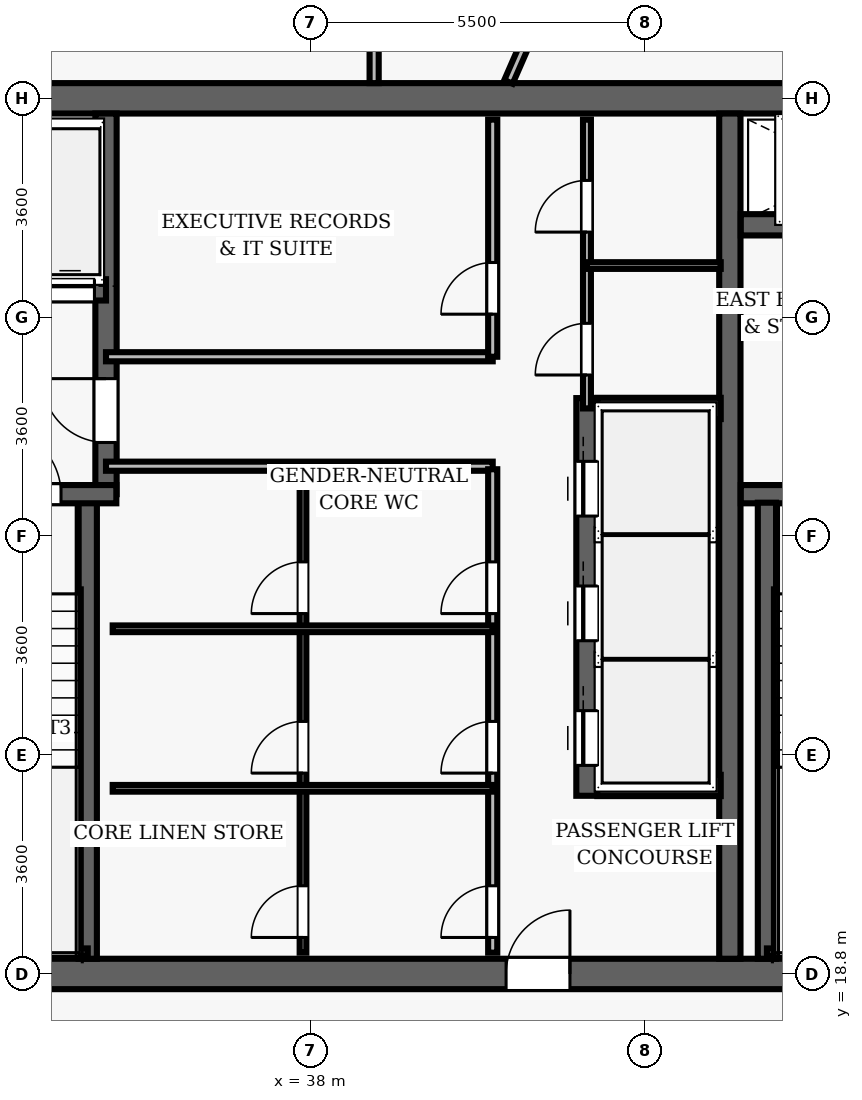
"""IFC4 building model, lengths in metres.
Left out: names, types, materials, properties, quantities, classifications, styles, units other than length and angle.
Written with IfcOpenShell. Run it as: python <this file> out.ifc"""

import sys

from ifc_helpers import new_model, si_unit, direction, frame, frame_2d, origin, place, context, subcontext, project, spatial, rectangle, extrude, element, fill, save


model = new_model("IFC4")
c1 = context("Model", 3, precision=1e-05, world=origin(), true_north=direction((0.0, 1.0)))
c2 = subcontext(c1, "Body", "Model", "MODEL_VIEW")
j1 = project(units=[si_unit("LENGTHUNIT", "METRE"), si_unit("PLANEANGLEUNIT", "RADIAN")], contexts=[c1])
p1 = place(None, origin())
s1 = spatial("IfcSite", under=j1, at=p1, CompositionType="ELEMENT")
p2 = place(p1, origin())
s2 = spatial("IfcBuilding", under=s1, at=p2, CompositionType="ELEMENT")
p3 = place(p2, frame((0.0, 0.0, 269.0)))
s3 = spatial("IfcBuildingStorey", under=s2, at=p3, CompositionType="ELEMENT", Elevation=269.0)
p4 = place(p3, frame((26.75, 18.8, 0.0), z_axis=(0.0, 0.0, 1.0), x_axis=(1.0, 0.0, 0.0)))
e1 = element("IfcWall", 1, at=p4, inside=s3, PredefinedType="SHEAR", context=c2, shape_type="SweptSolid", body=[
    extrude(rectangle(XDim=22.5, YDim=0.5, at=frame_2d((11.25, 0.0))), origin(), (0.0, 0.0, 1.0), 3.85),
])
p5 = place(p4, frame((14.47, 0.0, 0.0)))
e2 = element("IfcOpeningElement", 2, at=p5, cuts=e1, PredefinedType="OPENING", context=c2, shape_type="SweptSolid", body=[
    extrude(rectangle(XDim=1.05, YDim=2.15, at=frame_2d((0.525, 1.075))), frame((0.0, 0.26, 0.0), z_axis=(0.0, -1.0, 0.0), x_axis=(1.0, 0.0, 0.0)), (0.0, 0.0, 1.0), 0.52),
])
p6 = place(p3, frame((26.75, 33.2, 0.0), z_axis=(0.0, 0.0, 1.0), x_axis=(1.0, 0.0, 0.0)))
e3 = element("IfcWall", 3, at=p6, inside=s3, PredefinedType="SHEAR", context=c2, shape_type="SweptSolid", body=[
    extrude(rectangle(XDim=22.5, YDim=0.5, at=frame_2d((11.25, 0.0))), origin(), (0.0, 0.0, 1.0), 3.85),
])
p7 = place(p3, frame((44.9, 19.05, 0.0), z_axis=(0.0, 0.0, 1.0), x_axis=(0.0, 1.0, 0.0)))
e4 = element("IfcWall", 4, at=p7, inside=s3, PredefinedType="SHEAR", context=c2, shape_type="SweptSolid", body=[
    extrude(rectangle(XDim=13.9, YDim=0.35, at=frame_2d((6.95, 0.0))), origin(), (0.0, 0.0, 1.0), 3.85),
])
p8 = place(p3, frame((45.08, 26.69, 0.0), z_axis=(0.0, 0.0, 1.0), x_axis=(1.0, 0.0, 0.0)))
e5 = element("IfcWall", 5, at=p8, inside=s3, PredefinedType="SHEAR", context=c2, shape_type="SweptSolid", body=[
    extrude(rectangle(XDim=3.67, YDim=0.3, at=frame_2d((1.835, 0.0))), origin(), (0.0, 0.0, 1.0), 3.85),
])
p9 = place(p8, frame((1.05, 0.0, 0.0)))
e6 = element("IfcOpeningElement", 6, at=p9, cuts=e5, PredefinedType="OPENING", context=c2, shape_type="SweptSolid", body=[
    extrude(rectangle(XDim=1.1, YDim=2.15, at=frame_2d((0.55, 1.075))), frame((0.0, 0.16, 0.0), z_axis=(0.0, -1.0, 0.0), x_axis=(1.0, 0.0, 0.0)), (0.0, 0.0, 1.0), 0.32),
])
p10 = place(p3, frame((45.51, 19.05, 0.0), z_axis=(0.0, 0.0, 1.0), x_axis=(0.0, 1.0, 0.0)))
e7 = element("IfcWall", 7, at=p10, inside=s3, PredefinedType="SHEAR", context=c2, shape_type="SweptSolid", body=[
    extrude(rectangle(XDim=7.5, YDim=0.3, at=frame_2d((3.75, 0.0))), origin(), (0.0, 0.0, 1.0), 3.85),
])
p11 = place(p3, frame((45.51, 19.16, 0.0), z_axis=(0.0, 0.0, 1.0), x_axis=(1.0, 0.0, 0.0)))
e8 = element("IfcWall", 8, at=p11, inside=s3, PredefinedType="SHEAR", context=c2, shape_type="SweptSolid", body=[
    extrude(rectangle(XDim=3.095, YDim=0.12, at=frame_2d((1.547, 0.0))), origin(), (0.0, 0.0, 1.0), 3.85),
])
p12 = place(p3, frame((45.08, 31.12, 0.0), z_axis=(0.0, 0.0, 1.0), x_axis=(1.0, 0.0, 0.0)))
e9 = element("IfcWall", 9, at=p12, inside=s3, PredefinedType="SHEAR", context=c2, shape_type="SweptSolid", body=[
    extrude(rectangle(XDim=3.67, YDim=0.35, at=frame_2d((1.835, 0.0))), origin(), (0.0, 0.0, 1.0), 3.04),
])
p13 = place(p12, frame((1.25, 0.0, 0.0)))
e10 = element("IfcOpeningElement", 10, at=p13, cuts=e9, PredefinedType="OPENING", context=c2, shape_type="SweptSolid", body=[
    extrude(rectangle(XDim=1.1, YDim=2.15, at=frame_2d((0.55, 1.075))), frame((0.0, 0.185, 0.0), z_axis=(0.0, -1.0, 0.0), x_axis=(1.0, 0.0, 0.0)), (0.0, 0.0, 1.0), 0.37),
])
p14 = place(p3, frame((34.34, 19.05, 0.0), z_axis=(0.0, 0.0, 1.0), x_axis=(0.0, 1.0, 0.0)))
e11 = element("IfcWall", 11, at=p14, inside=s3, PredefinedType="SHEAR", context=c2, shape_type="SweptSolid", body=[
    extrude(rectangle(XDim=7.5, YDim=0.3, at=frame_2d((3.75, 0.0))), origin(), (0.0, 0.0, 1.0), 3.85),
])
p15 = place(p3, frame((34.64, 26.69, 0.0), z_axis=(0.0, 0.0, 1.0), x_axis=(0.0, 1.0, 0.0)))
e12 = element("IfcWall", 12, at=p15, inside=s3, PredefinedType="SHEAR", context=c2, shape_type="SweptSolid", body=[
    extrude(rectangle(XDim=6.26, YDim=0.35, at=frame_2d((3.13, 0.0))), origin(), (0.0, 0.0, 1.0), 3.85),
])
p16 = place(p15, frame((0.85, 0.0, 0.0)))
e13 = element("IfcOpeningElement", 13, at=p16, cuts=e12, PredefinedType="OPENING", context=c2, shape_type="SweptSolid", body=[
    extrude(rectangle(XDim=1.05, YDim=2.15, at=frame_2d((0.525, 1.075))), frame((0.0, 0.185, 0.0), z_axis=(0.0, -1.0, 0.0), x_axis=(1.0, 0.0, 0.0)), (0.0, 0.0, 1.0), 0.37),
])
p17 = place(p3, frame((31.25, 26.69, 0.0), z_axis=(0.0, 0.0, 1.0), x_axis=(1.0, 0.0, 0.0)))
e14 = element("IfcWall", 14, at=p17, inside=s3, PredefinedType="SHEAR", context=c2, shape_type="SweptSolid", body=[
    extrude(rectangle(XDim=3.56, YDim=0.3, at=frame_2d((1.78, 0.0))), origin(), (0.0, 0.0, 1.0), 3.85),
])
p18 = place(p17, frame((1.55, 0.0, 0.0)))
e15 = element("IfcOpeningElement", 15, at=p18, cuts=e14, PredefinedType="OPENING", context=c2, shape_type="SweptSolid", body=[
    extrude(rectangle(XDim=1.1, YDim=2.15, at=frame_2d((0.55, 1.075))), frame((0.0, 0.16, 0.0), z_axis=(0.0, -1.0, 0.0), x_axis=(1.0, 0.0, 0.0)), (0.0, 0.0, 1.0), 0.32),
])
p19 = place(p3, frame((31.3, 19.16, 0.0), z_axis=(0.0, 0.0, 1.0), x_axis=(1.0, 0.0, 0.0)))
e16 = element("IfcWall", 16, at=p19, inside=s3, PredefinedType="SHEAR", context=c2, shape_type="SweptSolid", body=[
    extrude(rectangle(XDim=3.04, YDim=0.12, at=frame_2d((1.52, 0.0))), origin(), (0.0, 0.0, 1.0), 3.85),
])
p20 = place(p3, frame((32.23, 30.05, 0.0), z_axis=(0.0, 0.0, 1.0), x_axis=(1.0, 0.0, 0.0)))
e17 = element("IfcWall", 17, at=p20, inside=s3, PredefinedType="SHEAR", context=c2, shape_type="SweptSolid", body=[
    extrude(rectangle(XDim=2.41, YDim=0.35, at=frame_2d((1.205, 0.0))), origin(), (0.0, 0.0, 1.0), 3.04),
])
p21 = place(p20, frame((0.42, 0.0, 0.0)))
e18 = element("IfcOpeningElement", 18, at=p21, cuts=e17, PredefinedType="OPENING", context=c2, shape_type="SweptSolid", body=[
    extrude(rectangle(XDim=0.8, YDim=2.15, at=frame_2d((0.4, 1.075))), frame((0.0, 0.185, 0.0), z_axis=(0.0, -1.0, 0.0), x_axis=(1.0, 0.0, 0.0)), (0.0, 0.0, 1.0), 0.37),
])
p22 = place(p20, frame((1.42, 0.0, 0.0)))
e19 = element("IfcOpeningElement", 19, at=p22, cuts=e17, PredefinedType="OPENING", context=c2, shape_type="SweptSolid", body=[
    extrude(rectangle(XDim=0.8, YDim=2.15, at=frame_2d((0.4, 1.075))), frame((0.0, 0.185, 0.0), z_axis=(0.0, -1.0, 0.0), x_axis=(1.0, 0.0, 0.0)), (0.0, 0.0, 1.0), 0.37),
])
p23 = place(p3, frame((42.55, 21.73, 0.0), z_axis=(0.0, 0.0, 1.0), x_axis=(0.0, 1.0, 0.0)))
e20 = element("IfcWall", 20, at=p23, inside=s3, PredefinedType="SHEAR", context=c2, shape_type="SweptSolid", body=[
    extrude(rectangle(XDim=6.54, YDim=0.35, at=frame_2d((3.27, 0.0))), origin(), (0.0, 0.0, 1.0), 3.04),
])
p24 = place(p23, frame((0.5, 0.0, 0.0)))
e21 = element("IfcOpeningElement", 21, at=p24, cuts=e20, PredefinedType="OPENING", context=c2, shape_type="SweptSolid", body=[
    extrude(rectangle(XDim=0.9, YDim=2.15, at=frame_2d((0.45, 1.075))), frame((0.0, 0.185, 0.0), z_axis=(0.0, -1.0, 0.0), x_axis=(1.0, 0.0, 0.0)), (0.0, 0.0, 1.0), 0.37),
])
p25 = place(p23, frame((2.55, 0.0, 0.0)))
e22 = element("IfcOpeningElement", 22, at=p25, cuts=e20, PredefinedType="OPENING", context=c2, shape_type="SweptSolid", body=[
    extrude(rectangle(XDim=0.9, YDim=2.15, at=frame_2d((0.45, 1.075))), frame((0.0, 0.185, 0.0), z_axis=(0.0, -1.0, 0.0), x_axis=(1.0, 0.0, 0.0)), (0.0, 0.0, 1.0), 0.37),
])
p26 = place(p23, frame((4.6, 0.0, 0.0)))
e23 = element("IfcOpeningElement", 23, at=p26, cuts=e20, PredefinedType="OPENING", context=c2, shape_type="SweptSolid", body=[
    extrude(rectangle(XDim=0.9, YDim=2.15, at=frame_2d((0.45, 1.075))), frame((0.0, 0.185, 0.0), z_axis=(0.0, -1.0, 0.0), x_axis=(1.0, 0.0, 0.0)), (0.0, 0.0, 1.0), 0.37),
])
for number, where, z_axis, x_axis in (
    (24, (42.72, 21.9, 0.0), (0.0, 0.0, 1.0), (1.0, 0.0, 0.0)),
    (25, (42.72, 28.1, 0.0), (0.0, 0.0, 1.0), (1.0, 0.0, 0.0)),
):
    element("IfcWall", number, at=place(p3, frame(where, z_axis=z_axis, x_axis=x_axis)), inside=s3, PredefinedType="SHEAR", context=c2, shape_type="SweptSolid", body=[
        extrude(rectangle(XDim=2.03, YDim=0.35, at=frame_2d((1.015, 0.0))), origin(), (0.0, 0.0, 1.0), 3.04),
    ])
for number, where, z_axis, x_axis in (
    (26, (34.64, 27.15, 0.0), (0.0, 0.0, 1.0), (1.0, 0.0, 0.0)),
    (27, (34.64, 28.95, 0.0), (0.0, 0.0, 1.0), (1.0, 0.0, 0.0)),
):
    element("IfcWall", number, at=place(p3, frame(where, z_axis=z_axis, x_axis=x_axis)), inside=s3, PredefinedType="PARTITIONING", context=c2, shape_type="SweptSolid", body=[
        extrude(rectangle(XDim=6.36, YDim=0.15, at=frame_2d((3.18, 0.0))), origin(), (0.0, 0.0, 1.0), 3.04),
    ])
p27 = place(p3, frame((41.0, 28.95, 0.0), z_axis=(0.0, 0.0, 1.0), x_axis=(0.0, 1.0, 0.0)))
e28 = element("IfcWall", 28, at=p27, inside=s3, PredefinedType="PARTITIONING", context=c2, shape_type="SweptSolid", body=[
    extrude(rectangle(XDim=3.9, YDim=0.15, at=frame_2d((1.95, 0.0))), origin(), (0.0, 0.0, 1.0), 3.04),
])
p28 = place(p27, frame((0.7, 0.0, 0.0)))
e29 = element("IfcOpeningElement", 29, at=p28, cuts=e28, PredefinedType="OPENING", context=c2, shape_type="SweptSolid", body=[
    extrude(rectangle(XDim=0.85, YDim=2.1, at=frame_2d((0.425, 1.05))), frame((0.0, 0.085, 0.0), z_axis=(0.0, -1.0, 0.0), x_axis=(1.0, 0.0, 0.0)), (0.0, 0.0, 1.0), 0.17),
])
p29 = place(p3, frame((41.0, 19.15, 0.0), z_axis=(0.0, 0.0, 1.0), x_axis=(0.0, 1.0, 0.0)))
e30 = element("IfcWall", 30, at=p29, inside=s3, PredefinedType="PARTITIONING", context=c2, shape_type="SweptSolid", body=[
    extrude(rectangle(XDim=7.95, YDim=0.15, at=frame_2d((3.975, 0.0))), origin(), (0.0, 0.0, 1.0), 3.04),
])
p30 = place(p29, frame((0.25, 0.0, 0.0)))
e31 = element("IfcOpeningElement", 31, at=p30, cuts=e30, PredefinedType="OPENING", context=c2, shape_type="SweptSolid", body=[
    extrude(rectangle(XDim=0.85, YDim=2.1, at=frame_2d((0.425, 1.05))), frame((0.0, 0.085, 0.0), z_axis=(0.0, -1.0, 0.0), x_axis=(1.0, 0.0, 0.0)), (0.0, 0.0, 1.0), 0.17),
])
p31 = place(p29, frame((2.953, 0.0, 0.0)))
e32 = element("IfcOpeningElement", 32, at=p31, cuts=e30, PredefinedType="OPENING", context=c2, shape_type="SweptSolid", body=[
    extrude(rectangle(XDim=0.85, YDim=2.1, at=frame_2d((0.425, 1.05))), frame((0.0, 0.085, 0.0), z_axis=(0.0, -1.0, 0.0), x_axis=(1.0, 0.0, 0.0)), (0.0, 0.0, 1.0), 0.17),
])
p32 = place(p29, frame((5.576, 0.0, 0.0)))
e33 = element("IfcOpeningElement", 33, at=p32, cuts=e30, PredefinedType="OPENING", context=c2, shape_type="SweptSolid", body=[
    extrude(rectangle(XDim=0.85, YDim=2.1, at=frame_2d((0.425, 1.05))), frame((0.0, 0.085, 0.0), z_axis=(0.0, -1.0, 0.0), x_axis=(1.0, 0.0, 0.0)), (0.0, 0.0, 1.0), 0.17),
])
p33 = place(p3, frame((37.88, 19.15, 0.0), z_axis=(0.0, 0.0, 1.0), x_axis=(0.0, 1.0, 0.0)))
e34 = element("IfcWall", 34, at=p33, inside=s3, PredefinedType="PARTITIONING", context=c2, shape_type="SweptSolid", body=[
    extrude(rectangle(XDim=7.95, YDim=0.11, at=frame_2d((3.975, 0.0))), origin(), (0.0, 0.0, 1.0), 3.04),
])
p34 = place(p33, frame((0.25, 0.0, 0.0)))
e35 = element("IfcOpeningElement", 35, at=p34, cuts=e34, PredefinedType="OPENING", context=c2, shape_type="SweptSolid", body=[
    extrude(rectangle(XDim=0.85, YDim=2.1, at=frame_2d((0.425, 1.05))), frame((0.0, 0.065, 0.0), z_axis=(0.0, -1.0, 0.0), x_axis=(1.0, 0.0, 0.0)), (0.0, 0.0, 1.0), 0.13),
])
p35 = place(p33, frame((2.953, 0.0, 0.0)))
e36 = element("IfcOpeningElement", 36, at=p35, cuts=e34, PredefinedType="OPENING", context=c2, shape_type="SweptSolid", body=[
    extrude(rectangle(XDim=0.85, YDim=2.1, at=frame_2d((0.425, 1.05))), frame((0.0, 0.065, 0.0), z_axis=(0.0, -1.0, 0.0), x_axis=(1.0, 0.0, 0.0)), (0.0, 0.0, 1.0), 0.13),
])
p36 = place(p33, frame((5.576, 0.0, 0.0)))
e37 = element("IfcOpeningElement", 37, at=p36, cuts=e34, PredefinedType="OPENING", context=c2, shape_type="SweptSolid", body=[
    extrude(rectangle(XDim=0.85, YDim=2.1, at=frame_2d((0.425, 1.05))), frame((0.0, 0.065, 0.0), z_axis=(0.0, -1.0, 0.0), x_axis=(1.0, 0.0, 0.0)), (0.0, 0.0, 1.0), 0.13),
])
for number, where, z_axis, x_axis in (
    (38, (34.75, 21.853, 0.0), (0.0, 0.0, 1.0), (1.0, 0.0, 0.0)),
    (39, (34.75, 24.477, 0.0), (0.0, 0.0, 1.0), (1.0, 0.0, 0.0)),
):
    element("IfcWall", number, at=place(p3, frame(where, z_axis=z_axis, x_axis=x_axis)), inside=s3, PredefinedType="PARTITIONING", context=c2, shape_type="SweptSolid", body=[
        extrude(rectangle(XDim=6.25, YDim=0.11, at=frame_2d((3.125, 0.0))), origin(), (0.0, 0.0, 1.0), 3.04),
    ])
p37 = place(p3, frame((42.55, 28.1, 0.0), z_axis=(0.0, 0.0, 1.0), x_axis=(0.0, 1.0, 0.0)))
e40 = element("IfcWall", 40, at=p37, inside=s3, PredefinedType="PARTITIONING", context=c2, shape_type="SweptSolid", body=[
    extrude(rectangle(XDim=4.75, YDim=0.13, at=frame_2d((2.375, 0.0))), origin(), (0.0, 0.0, 1.0), 3.04),
])
p38 = place(p37, frame((0.55, 0.0, 0.0)))
e41 = element("IfcOpeningElement", 41, at=p38, cuts=e40, PredefinedType="OPENING", context=c2, shape_type="SweptSolid", body=[
    extrude(rectangle(XDim=0.85, YDim=2.1, at=frame_2d((0.425, 1.05))), frame((0.0, 0.075, 0.0), z_axis=(0.0, -1.0, 0.0), x_axis=(1.0, 0.0, 0.0)), (0.0, 0.0, 1.0), 0.15),
])
p39 = place(p37, frame((2.9, 0.0, 0.0)))
e42 = element("IfcOpeningElement", 42, at=p39, cuts=e40, PredefinedType="OPENING", context=c2, shape_type="SweptSolid", body=[
    extrude(rectangle(XDim=0.85, YDim=2.1, at=frame_2d((0.425, 1.05))), frame((0.0, 0.075, 0.0), z_axis=(0.0, -1.0, 0.0), x_axis=(1.0, 0.0, 0.0)), (0.0, 0.0, 1.0), 0.15),
])
p40 = place(p3, frame((42.55, 30.45, 0.0), z_axis=(0.0, 0.0, 1.0), x_axis=(1.0, 0.0, 0.0)))
e43 = element("IfcWall", 43, at=p40, inside=s3, PredefinedType="PARTITIONING", context=c2, shape_type="SweptSolid", body=[
    extrude(rectangle(XDim=2.2, YDim=0.11, at=frame_2d((1.1, 0.0))), origin(), (0.0, 0.0, 1.0), 3.04),
])
p41 = place(p3, frame((39.05, 33.45, 0.0), z_axis=(0.0, 0.0, 1.0), x_axis=(0.0, 1.0, 0.0)))
e44 = element("IfcWall", 44, at=p41, inside=s3, PredefinedType="PARTITIONING", context=c2, shape_type="SweptSolid", body=[
    extrude(rectangle(XDim=6.95, YDim=0.15, at=frame_2d((3.475, 0.0))), origin(), (0.0, 0.0, 1.0), 3.04),
])
p42 = place(p41, frame((0.988, 0.0, 0.0)))
e45 = element("IfcOpeningElement", 45, at=p42, cuts=e44, PredefinedType="OPENING", context=c2, shape_type="SweptSolid", body=[
    extrude(rectangle(XDim=1.5, YDim=2.2, at=frame_2d((0.75, 1.1))), frame((0.0, 0.085, 0.0), z_axis=(0.0, -1.0, 0.0), x_axis=(1.0, 0.0, 0.0)), (0.0, 0.0, 1.0), 0.17),
])
p43 = place(p3, frame((41.259, 33.47, 0.0), z_axis=(0.0, 0.0, 1.0), x_axis=(0.399896869604, 0.916560141879, 0.0)))
e46 = element("IfcWall", 46, at=p43, inside=s3, PredefinedType="PARTITIONING", context=c2, shape_type="SweptSolid", body=[
    extrude(rectangle(XDim=12.616, YDim=0.15, at=frame_2d((6.308, 0.0))), origin(), (0.0, 0.0, 1.0), 3.04),
])
p44 = place(p18, origin())
e47 = element("IfcDoor", 47, at=p44, inside=s3, OperationType="SINGLE_SWING_LEFT", PredefinedType="DOOR", context=c2, shape_type="SweptSolid", body=[
    extrude(rectangle(XDim=1.1, YDim=2.15, at=frame_2d((0.55, 1.075))), frame((0.0, 0.025, 0.0), z_axis=(0.0, -1.0, 0.0), x_axis=(1.0, 0.0, 0.0)), (0.0, 0.0, 1.0), 0.05),
])
fill(e15, e47)
p45 = place(p5, origin())
e48 = element("IfcDoor", 48, at=p45, inside=s3, OperationType="SINGLE_SWING_RIGHT", PredefinedType="DOOR", context=c2, shape_type="SweptSolid", body=[
    extrude(rectangle(XDim=1.05, YDim=2.15, at=frame_2d((0.525, 1.075))), frame((0.0, 0.025, 0.0), z_axis=(0.0, -1.0, 0.0), x_axis=(1.0, 0.0, 0.0)), (0.0, 0.0, 1.0), 0.05),
])
fill(e2, e48)
p46 = place(p16, origin())
e49 = element("IfcDoor", 49, at=p46, inside=s3, OperationType="SINGLE_SWING_RIGHT", PredefinedType="DOOR", context=c2, shape_type="SweptSolid", body=[
    extrude(rectangle(XDim=1.05, YDim=2.15, at=frame_2d((0.525, 1.075))), frame((0.0, 0.025, 0.0), z_axis=(0.0, -1.0, 0.0), x_axis=(1.0, 0.0, 0.0)), (0.0, 0.0, 1.0), 0.05),
])
fill(e13, e49)
p47 = place(p28, origin())
e50 = element("IfcDoor", 50, at=p47, inside=s3, OperationType="SINGLE_SWING_LEFT", PredefinedType="DOOR", context=c2, shape_type="SweptSolid", body=[
    extrude(rectangle(XDim=0.85, YDim=2.1, at=frame_2d((0.425, 1.05))), frame((0.0, 0.025, 0.0), z_axis=(0.0, -1.0, 0.0), x_axis=(1.0, 0.0, 0.0)), (0.0, 0.0, 1.0), 0.05),
])
fill(e29, e50)
p48 = place(p30, origin())
e51 = element("IfcDoor", 51, at=p48, inside=s3, OperationType="SINGLE_SWING_LEFT", PredefinedType="DOOR", context=c2, shape_type="SweptSolid", body=[
    extrude(rectangle(XDim=0.85, YDim=2.1, at=frame_2d((0.425, 1.05))), frame((0.0, 0.025, 0.0), z_axis=(0.0, -1.0, 0.0), x_axis=(1.0, 0.0, 0.0)), (0.0, 0.0, 1.0), 0.05),
])
fill(e31, e51)
p49 = place(p34, origin())
e52 = element("IfcDoor", 52, at=p49, inside=s3, OperationType="SINGLE_SWING_LEFT", PredefinedType="DOOR", context=c2, shape_type="SweptSolid", body=[
    extrude(rectangle(XDim=0.85, YDim=2.1, at=frame_2d((0.425, 1.05))), frame((0.0, 0.025, 0.0), z_axis=(0.0, -1.0, 0.0), x_axis=(1.0, 0.0, 0.0)), (0.0, 0.0, 1.0), 0.05),
])
fill(e35, e52)
p50 = place(p31, origin())
e53 = element("IfcDoor", 53, at=p50, inside=s3, OperationType="SINGLE_SWING_LEFT", PredefinedType="DOOR", context=c2, shape_type="SweptSolid", body=[
    extrude(rectangle(XDim=0.85, YDim=2.1, at=frame_2d((0.425, 1.05))), frame((0.0, 0.025, 0.0), z_axis=(0.0, -1.0, 0.0), x_axis=(1.0, 0.0, 0.0)), (0.0, 0.0, 1.0), 0.05),
])
fill(e32, e53)
p51 = place(p35, origin())
e54 = element("IfcDoor", 54, at=p51, inside=s3, OperationType="SINGLE_SWING_LEFT", PredefinedType="DOOR", context=c2, shape_type="SweptSolid", body=[
    extrude(rectangle(XDim=0.85, YDim=2.1, at=frame_2d((0.425, 1.05))), frame((0.0, 0.025, 0.0), z_axis=(0.0, -1.0, 0.0), x_axis=(1.0, 0.0, 0.0)), (0.0, 0.0, 1.0), 0.05),
])
fill(e36, e54)
p52 = place(p32, origin())
e55 = element("IfcDoor", 55, at=p52, inside=s3, OperationType="SINGLE_SWING_LEFT", PredefinedType="DOOR", context=c2, shape_type="SweptSolid", body=[
    extrude(rectangle(XDim=0.85, YDim=2.1, at=frame_2d((0.425, 1.05))), frame((0.0, 0.025, 0.0), z_axis=(0.0, -1.0, 0.0), x_axis=(1.0, 0.0, 0.0)), (0.0, 0.0, 1.0), 0.05),
])
fill(e33, e55)
p53 = place(p36, origin())
e56 = element("IfcDoor", 56, at=p53, inside=s3, OperationType="SINGLE_SWING_LEFT", PredefinedType="DOOR", context=c2, shape_type="SweptSolid", body=[
    extrude(rectangle(XDim=0.85, YDim=2.1, at=frame_2d((0.425, 1.05))), frame((0.0, 0.025, 0.0), z_axis=(0.0, -1.0, 0.0), x_axis=(1.0, 0.0, 0.0)), (0.0, 0.0, 1.0), 0.05),
])
fill(e37, e56)
p54 = place(p38, origin())
e57 = element("IfcDoor", 57, at=p54, inside=s3, OperationType="SINGLE_SWING_LEFT", PredefinedType="DOOR", context=c2, shape_type="SweptSolid", body=[
    extrude(rectangle(XDim=0.85, YDim=2.1, at=frame_2d((0.425, 1.05))), frame((0.0, 0.025, 0.0), z_axis=(0.0, -1.0, 0.0), x_axis=(1.0, 0.0, 0.0)), (0.0, 0.0, 1.0), 0.05),
])
fill(e41, e57)
p55 = place(p39, origin())
e58 = element("IfcDoor", 58, at=p55, inside=s3, OperationType="SINGLE_SWING_LEFT", PredefinedType="DOOR", context=c2, shape_type="SweptSolid", body=[
    extrude(rectangle(XDim=0.85, YDim=2.1, at=frame_2d((0.425, 1.05))), frame((0.0, 0.025, 0.0), z_axis=(0.0, -1.0, 0.0), x_axis=(1.0, 0.0, 0.0)), (0.0, 0.0, 1.0), 0.05),
])
fill(e42, e58)
p56 = place(p24, origin())
e59 = element("IfcDoor", 59, at=p56, inside=s3, OperationType="SLIDING_TO_LEFT", PredefinedType="DOOR", context=c2, shape_type="SweptSolid", body=[
    extrude(rectangle(XDim=0.9, YDim=2.15, at=frame_2d((0.45, 1.075))), frame((0.0, 0.025, 0.0), z_axis=(0.0, -1.0, 0.0), x_axis=(1.0, 0.0, 0.0)), (0.0, 0.0, 1.0), 0.05),
])
fill(e21, e59)
p57 = place(p25, origin())
e60 = element("IfcDoor", 60, at=p57, inside=s3, OperationType="SLIDING_TO_LEFT", PredefinedType="DOOR", context=c2, shape_type="SweptSolid", body=[
    extrude(rectangle(XDim=0.9, YDim=2.15, at=frame_2d((0.45, 1.075))), frame((0.0, 0.025, 0.0), z_axis=(0.0, -1.0, 0.0), x_axis=(1.0, 0.0, 0.0)), (0.0, 0.0, 1.0), 0.05),
])
fill(e22, e60)
p58 = place(p26, origin())
e61 = element("IfcDoor", 61, at=p58, inside=s3, OperationType="SLIDING_TO_LEFT", PredefinedType="DOOR", context=c2, shape_type="SweptSolid", body=[
    extrude(rectangle(XDim=0.9, YDim=2.15, at=frame_2d((0.45, 1.075))), frame((0.0, 0.025, 0.0), z_axis=(0.0, -1.0, 0.0), x_axis=(1.0, 0.0, 0.0)), (0.0, 0.0, 1.0), 0.05),
])
fill(e23, e61)
p59 = place(p22, origin())
e62 = element("IfcDoor", 62, at=p59, inside=s3, OperationType="SLIDING_TO_LEFT", PredefinedType="DOOR", context=c2, shape_type="SweptSolid", body=[
    extrude(rectangle(XDim=0.8, YDim=2.15, at=frame_2d((0.4, 1.075))), frame((0.0, 0.025, 0.0), z_axis=(0.0, -1.0, 0.0), x_axis=(1.0, 0.0, 0.0)), (0.0, 0.0, 1.0), 0.05),
])
fill(e19, e62)
save(model, sys.argv[1])
